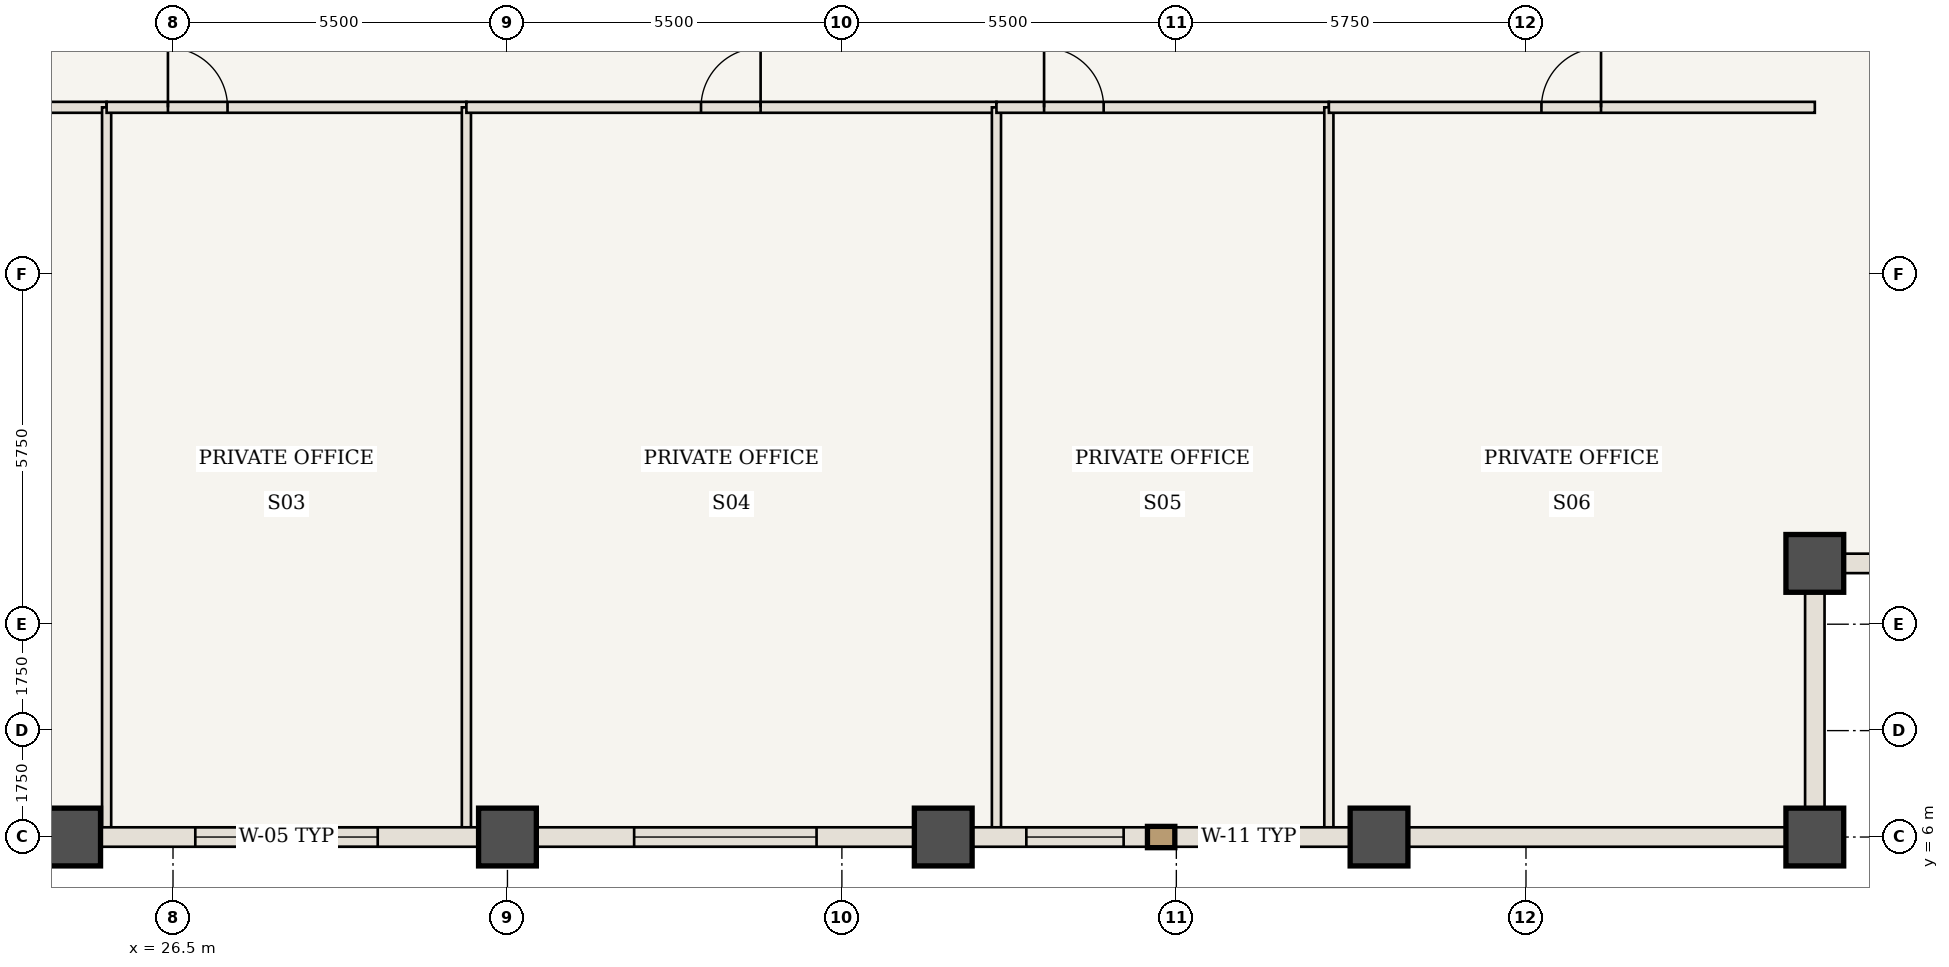
"""IFC4 building model, lengths in metres.
Left out: names, types, materials, properties, quantities, classifications, styles, units other than length and angle.
Written with IfcOpenShell. Run it as: python <this file> out.ifc"""

import sys

from ifc_helpers import new_model, si_unit, direction, frame, frame_2d, origin, origin_2d, place, context, subcontext, project, spatial, rectangle, extrude, element, fill, save


model = new_model("IFC4")
c1 = context("Model", 3, precision=1e-05, world=origin(), true_north=direction((0.0, 1.0)))
c2 = subcontext(c1, "Body", "Model", "MODEL_VIEW")
j1 = project(units=[si_unit("LENGTHUNIT", "METRE"), si_unit("PLANEANGLEUNIT", "RADIAN")], contexts=[c1])
p1 = place(None, origin())
s1 = spatial("IfcSite", under=j1, at=p1, CompositionType="ELEMENT")
p2 = place(p1, origin())
s2 = spatial("IfcBuilding", under=s1, at=p2, CompositionType="ELEMENT")
p3 = place(p2, frame((0.0, 0.0, 129.85)))
s3 = spatial("IfcBuildingStorey", under=s2, at=p3, CompositionType="ELEMENT", Elevation=129.85)
for number, where, z_axis, x_axis in (
    (1, (53.5, 6.0, 0.0), (0.0, 0.0, 1.0), (1.0, 0.0, 0.0)),
    (2, (53.5, 10.5, 0.0), (0.0, 0.0, 1.0), (1.0, 0.0, 0.0)),
    (3, (24.833, 6.0, 0.0), (0.0, 0.0, 1.0), (1.0, 0.0, 0.0)),
    (4, (32.0, 6.0, 0.0), (0.0, 0.0, 1.0), (1.0, 0.0, 0.0)),
    (5, (39.167, 6.0, 0.0), (0.0, 0.0, 1.0), (1.0, 0.0, 0.0)),
    (6, (46.333, 6.0, 0.0), (0.0, 0.0, 1.0), (1.0, 0.0, 0.0)),
):
    element("IfcColumn", number, at=place(p3, frame(where, z_axis=z_axis, x_axis=x_axis)), inside=s3, PredefinedType="COLUMN", context=c2, shape_type="SweptSolid", body=[
        extrude(rectangle(XDim=0.95, YDim=0.95, at=origin_2d()), origin(), (0.0, 0.0, 1.0), 3.85),
    ])
p4 = place(p3, frame((16.542, 18.0, 0.0), z_axis=(0.0, 0.0, 1.0), x_axis=(1.0, 0.0, 0.0)))
e7 = element("IfcWall", 7, at=p4, inside=s3, PredefinedType="STANDARD", context=c2, shape_type="SweptSolid", body=[
    extrude(rectangle(XDim=8.866, YDim=0.18, at=frame_2d((4.433, 0.0))), origin(), (0.0, 0.0, 1.0), 3.685),
])
p5 = place(p4, frame((5.383, 0.0, 0.0)))
e8 = element("IfcOpeningElement", 8, at=p5, cuts=e7, PredefinedType="OPENING", context=c2, shape_type="SweptSolid", body=[
    extrude(rectangle(XDim=0.98, YDim=2.2, at=frame_2d((0.49, 1.1))), frame((0.0, 0.1, 0.0), z_axis=(0.0, -1.0, 0.0), x_axis=(1.0, 0.0, 0.0)), (0.0, 0.0, 1.0), 0.2),
])
p6 = place(p3, frame((25.408, 6.06, 0.0), z_axis=(0.0, 0.0, 1.0), x_axis=(0.0, 1.0, 0.0)))
e9 = element("IfcWall", 9, at=p6, inside=s3, PredefinedType="STANDARD", context=c2, shape_type="SweptSolid", body=[
    extrude(rectangle(XDim=11.94, YDim=0.15, at=frame_2d((5.97, 0.0))), origin(), (0.0, 0.0, 1.0), 3.685),
])
p7 = place(p3, frame((25.408, 18.0, 0.0), z_axis=(0.0, 0.0, 1.0), x_axis=(1.0, 0.0, 0.0)))
e10 = element("IfcWall", 10, at=p7, inside=s3, PredefinedType="STANDARD", context=c2, shape_type="SweptSolid", body=[
    extrude(rectangle(XDim=5.917, YDim=0.18, at=frame_2d((2.958, 0.0))), origin(), (0.0, 0.0, 1.0), 3.685),
])
p8 = place(p7, frame((1.008, 0.0, 0.0)))
e11 = element("IfcOpeningElement", 11, at=p8, cuts=e10, PredefinedType="OPENING", context=c2, shape_type="SweptSolid", body=[
    extrude(rectangle(XDim=0.98, YDim=2.2, at=frame_2d((0.49, 1.1))), frame((0.0, 0.1, 0.0), z_axis=(0.0, -1.0, 0.0), x_axis=(1.0, 0.0, 0.0)), (0.0, 0.0, 1.0), 0.2),
])
p9 = place(p3, frame((31.325, 6.06, 0.0), z_axis=(0.0, 0.0, 1.0), x_axis=(0.0, 1.0, 0.0)))
e12 = element("IfcWall", 12, at=p9, inside=s3, PredefinedType="STANDARD", context=c2, shape_type="SweptSolid", body=[
    extrude(rectangle(XDim=11.94, YDim=0.15, at=frame_2d((5.97, 0.0))), origin(), (0.0, 0.0, 1.0), 3.685),
])
p10 = place(p3, frame((31.325, 18.0, 0.0), z_axis=(0.0, 0.0, 1.0), x_axis=(1.0, 0.0, 0.0)))
e13 = element("IfcWall", 13, at=p10, inside=s3, PredefinedType="STANDARD", context=c2, shape_type="SweptSolid", body=[
    extrude(rectangle(XDim=8.717, YDim=0.18, at=frame_2d((4.358, 0.0))), origin(), (0.0, 0.0, 1.0), 3.685),
])
p11 = place(p10, frame((3.858, 0.0, 0.0)))
e14 = element("IfcOpeningElement", 14, at=p11, cuts=e13, PredefinedType="OPENING", context=c2, shape_type="SweptSolid", body=[
    extrude(rectangle(XDim=0.98, YDim=2.2, at=frame_2d((0.49, 1.1))), frame((0.0, 0.1, 0.0), z_axis=(0.0, -1.0, 0.0), x_axis=(1.0, 0.0, 0.0)), (0.0, 0.0, 1.0), 0.2),
])
p12 = place(p3, frame((40.042, 6.06, 0.0), z_axis=(0.0, 0.0, 1.0), x_axis=(0.0, 1.0, 0.0)))
e15 = element("IfcWall", 15, at=p12, inside=s3, PredefinedType="STANDARD", context=c2, shape_type="SweptSolid", body=[
    extrude(rectangle(XDim=11.94, YDim=0.15, at=frame_2d((5.97, 0.0))), origin(), (0.0, 0.0, 1.0), 3.685),
])
p13 = place(p3, frame((40.042, 18.0, 0.0), z_axis=(0.0, 0.0, 1.0), x_axis=(1.0, 0.0, 0.0)))
e16 = element("IfcWall", 16, at=p13, inside=s3, PredefinedType="STANDARD", context=c2, shape_type="SweptSolid", body=[
    extrude(rectangle(XDim=5.467, YDim=0.18, at=frame_2d((2.733, 0.0))), origin(), (0.0, 0.0, 1.0), 3.685),
])
p14 = place(p13, frame((0.783, 0.0, 0.0)))
e17 = element("IfcOpeningElement", 17, at=p14, cuts=e16, PredefinedType="OPENING", context=c2, shape_type="SweptSolid", body=[
    extrude(rectangle(XDim=0.98, YDim=2.2, at=frame_2d((0.49, 1.1))), frame((0.0, 0.1, 0.0), z_axis=(0.0, -1.0, 0.0), x_axis=(1.0, 0.0, 0.0)), (0.0, 0.0, 1.0), 0.2),
])
p15 = place(p3, frame((45.508, 6.06, 0.0), z_axis=(0.0, 0.0, 1.0), x_axis=(0.0, 1.0, 0.0)))
e18 = element("IfcWall", 18, at=p15, inside=s3, PredefinedType="STANDARD", context=c2, shape_type="SweptSolid", body=[
    extrude(rectangle(XDim=11.94, YDim=0.15, at=frame_2d((5.97, 0.0))), origin(), (0.0, 0.0, 1.0), 3.685),
])
p16 = place(p3, frame((45.508, 18.0, 0.0), z_axis=(0.0, 0.0, 1.0), x_axis=(1.0, 0.0, 0.0)))
e19 = element("IfcWall", 19, at=p16, inside=s3, PredefinedType="STANDARD", context=c2, shape_type="SweptSolid", body=[
    extrude(rectangle(XDim=7.992, YDim=0.18, at=frame_2d((3.996, 0.0))), origin(), (0.0, 0.0, 1.0), 3.685),
])
p17 = place(p16, frame((3.496, 0.0, 0.0)))
e20 = element("IfcOpeningElement", 20, at=p17, cuts=e19, PredefinedType="OPENING", context=c2, shape_type="SweptSolid", body=[
    extrude(rectangle(XDim=0.98, YDim=2.2, at=frame_2d((0.49, 1.1))), frame((0.0, 0.1, 0.0), z_axis=(0.0, -1.0, 0.0), x_axis=(1.0, 0.0, 0.0)), (0.0, 0.0, 1.0), 0.2),
])
p18 = place(p3, frame((24.833, 6.0, 0.0), z_axis=(0.0, 0.0, 1.0), x_axis=(-1.0, 0.0, 0.0)))
e21 = element("IfcWall", 21, at=p18, inside=s3, PredefinedType="USERDEFINED", context=c2, shape_type="SweptSolid", body=[
    extrude(rectangle(XDim=7.167, YDim=0.32, at=frame_2d((3.583, 0.0))), origin(), (0.0, 0.0, 1.0), 2.885),
])
p19 = place(p18, frame((0.792, 0.0, 0.85)))
e22 = element("IfcOpeningElement", 22, at=p19, cuts=e21, PredefinedType="OPENING", context=c2, shape_type="SweptSolid", body=[
    extrude(rectangle(XDim=2.2, YDim=1.835, at=frame_2d((1.1, 0.917))), frame((0.0, 0.17, 0.0), z_axis=(0.0, -1.0, 0.0), x_axis=(1.0, 0.0, 0.0)), (0.0, 0.0, 1.0), 0.34),
])
p20 = place(p18, frame((4.175, 0.0, 0.85)))
e23 = element("IfcOpeningElement", 23, at=p20, cuts=e21, PredefinedType="OPENING", context=c2, shape_type="SweptSolid", body=[
    extrude(rectangle(XDim=2.2, YDim=1.835, at=frame_2d((1.1, 0.917))), frame((0.0, 0.17, 0.0), z_axis=(0.0, -1.0, 0.0), x_axis=(1.0, 0.0, 0.0)), (0.0, 0.0, 1.0), 0.34),
])
p21 = place(p3, frame((32.0, 6.0, 0.0), z_axis=(0.0, 0.0, 1.0), x_axis=(-1.0, 0.0, 0.0)))
e24 = element("IfcWall", 24, at=p21, inside=s3, PredefinedType="USERDEFINED", context=c2, shape_type="SweptSolid", body=[
    extrude(rectangle(XDim=7.167, YDim=0.32, at=frame_2d((3.583, 0.0))), origin(), (0.0, 0.0, 1.0), 2.885),
])
p22 = place(p21, frame((2.133, 0.0, 0.85)))
e25 = element("IfcOpeningElement", 25, at=p22, cuts=e24, PredefinedType="OPENING", context=c2, shape_type="SweptSolid", body=[
    extrude(rectangle(XDim=3.0, YDim=1.835, at=frame_2d((1.5, 0.917))), frame((0.0, 0.17, 0.0), z_axis=(0.0, -1.0, 0.0), x_axis=(1.0, 0.0, 0.0)), (0.0, 0.0, 1.0), 0.34),
])
p23 = place(p3, frame((39.167, 6.0, 0.0), z_axis=(0.0, 0.0, 1.0), x_axis=(-1.0, 0.0, 0.0)))
e26 = element("IfcWall", 26, at=p23, inside=s3, PredefinedType="USERDEFINED", context=c2, shape_type="SweptSolid", body=[
    extrude(rectangle(XDim=7.167, YDim=0.32, at=frame_2d((3.583, 0.0))), origin(), (0.0, 0.0, 1.0), 2.885),
])
p24 = place(p23, frame((2.083, 0.0, 0.85)))
e27 = element("IfcOpeningElement", 27, at=p24, cuts=e26, PredefinedType="OPENING", context=c2, shape_type="SweptSolid", body=[
    extrude(rectangle(XDim=3.0, YDim=1.835, at=frame_2d((1.5, 0.917))), frame((0.0, 0.17, 0.0), z_axis=(0.0, -1.0, 0.0), x_axis=(1.0, 0.0, 0.0)), (0.0, 0.0, 1.0), 0.34),
])
p25 = place(p3, frame((46.333, 6.0, 0.0), z_axis=(0.0, 0.0, 1.0), x_axis=(-1.0, 0.0, 0.0)))
e28 = element("IfcWall", 28, at=p25, inside=s3, PredefinedType="USERDEFINED", context=c2, shape_type="SweptSolid", body=[
    extrude(rectangle(XDim=7.167, YDim=0.32, at=frame_2d((3.583, 0.0))), origin(), (0.0, 0.0, 1.0), 2.885),
])
p26 = place(p25, frame((1.342, 0.0, 0.85)))
e29 = element("IfcOpeningElement", 29, at=p26, cuts=e28, PredefinedType="OPENING", context=c2, shape_type="SweptSolid", body=[
    extrude(rectangle(XDim=1.6, YDim=1.835, at=frame_2d((0.8, 0.917))), frame((0.0, 0.17, 0.0), z_axis=(0.0, -1.0, 0.0), x_axis=(1.0, 0.0, 0.0)), (0.0, 0.0, 1.0), 0.34),
])
p27 = place(p25, frame((4.2, 0.0, 0.85)))
e30 = element("IfcOpeningElement", 30, at=p27, cuts=e28, PredefinedType="OPENING", context=c2, shape_type="SweptSolid", body=[
    extrude(rectangle(XDim=1.6, YDim=1.835, at=frame_2d((0.8, 0.917))), frame((0.0, 0.17, 0.0), z_axis=(0.0, -1.0, 0.0), x_axis=(1.0, 0.0, 0.0)), (0.0, 0.0, 1.0), 0.34),
])
p28 = place(p3, frame((53.5, 6.0, 0.0), z_axis=(0.0, 0.0, 1.0), x_axis=(-1.0, 0.0, 0.0)))
e31 = element("IfcWall", 31, at=p28, inside=s3, PredefinedType="USERDEFINED", context=c2, shape_type="SweptSolid", body=[
    extrude(rectangle(XDim=7.167, YDim=0.32, at=frame_2d((3.583, 0.0))), origin(), (0.0, 0.0, 1.0), 2.885),
])
for number, where, z_axis, x_axis in (
    (32, (53.5, 10.5, 0.0), (0.0, 0.0, 1.0), (0.0, -1.0, 0.0)),
    (33, (58.0, 10.5, 0.0), (0.0, 0.0, 1.0), (-1.0, 0.0, 0.0)),
):
    element("IfcWall", number, at=place(p3, frame(where, z_axis=z_axis, x_axis=x_axis)), inside=s3, PredefinedType="USERDEFINED", context=c2, shape_type="SweptSolid", body=[
        extrude(rectangle(XDim=4.5, YDim=0.32, at=frame_2d((2.25, 0.0))), origin(), (0.0, 0.0, 1.0), 2.885),
    ])
p29 = place(p8, origin())
e34 = element("IfcDoor", 34, at=p29, inside=s3, OperationType="SINGLE_SWING_LEFT", PredefinedType="DOOR", context=c2, shape_type="SweptSolid", body=[
    extrude(rectangle(XDim=0.98, YDim=2.2, at=frame_2d((0.49, 1.1))), frame((0.0, 0.025, 0.0), z_axis=(0.0, -1.0, 0.0), x_axis=(1.0, 0.0, 0.0)), (0.0, 0.0, 1.0), 0.05),
])
fill(e11, e34)
p30 = place(p11, origin())
e35 = element("IfcDoor", 35, at=p30, inside=s3, OperationType="SINGLE_SWING_RIGHT", PredefinedType="DOOR", context=c2, shape_type="SweptSolid", body=[
    extrude(rectangle(XDim=0.98, YDim=2.2, at=frame_2d((0.49, 1.1))), frame((0.0, 0.025, 0.0), z_axis=(0.0, -1.0, 0.0), x_axis=(1.0, 0.0, 0.0)), (0.0, 0.0, 1.0), 0.05),
])
fill(e14, e35)
p31 = place(p14, origin())
e36 = element("IfcDoor", 36, at=p31, inside=s3, OperationType="SINGLE_SWING_LEFT", PredefinedType="DOOR", context=c2, shape_type="SweptSolid", body=[
    extrude(rectangle(XDim=0.98, YDim=2.2, at=frame_2d((0.49, 1.1))), frame((0.0, 0.025, 0.0), z_axis=(0.0, -1.0, 0.0), x_axis=(1.0, 0.0, 0.0)), (0.0, 0.0, 1.0), 0.05),
])
fill(e17, e36)
p32 = place(p17, origin())
e37 = element("IfcDoor", 37, at=p32, inside=s3, OperationType="SINGLE_SWING_RIGHT", PredefinedType="DOOR", context=c2, shape_type="SweptSolid", body=[
    extrude(rectangle(XDim=0.98, YDim=2.2, at=frame_2d((0.49, 1.1))), frame((0.0, 0.025, 0.0), z_axis=(0.0, -1.0, 0.0), x_axis=(1.0, 0.0, 0.0)), (0.0, 0.0, 1.0), 0.05),
])
fill(e20, e37)
p33 = place(p22, origin())
e38 = element("IfcWindow", 38, at=p33, inside=s3, PartitioningType="SINGLE_PANEL", PredefinedType="WINDOW", context=c2, shape_type="SweptSolid", body=[
    extrude(rectangle(XDim=3.0, YDim=1.835, at=frame_2d((1.5, 0.917))), frame((0.0, 0.03, 0.0), z_axis=(0.0, -1.0, 0.0), x_axis=(1.0, 0.0, 0.0)), (0.0, 0.0, 1.0), 0.06),
])
fill(e25, e38)
p34 = place(p24, origin())
e39 = element("IfcWindow", 39, at=p34, inside=s3, PartitioningType="SINGLE_PANEL", PredefinedType="WINDOW", context=c2, shape_type="SweptSolid", body=[
    extrude(rectangle(XDim=3.0, YDim=1.835, at=frame_2d((1.5, 0.917))), frame((0.0, 0.03, 0.0), z_axis=(0.0, -1.0, 0.0), x_axis=(1.0, 0.0, 0.0)), (0.0, 0.0, 1.0), 0.06),
])
fill(e27, e39)
p35 = place(p26, origin())
e40 = element("IfcWindow", 40, at=p35, inside=s3, PartitioningType="SINGLE_PANEL", PredefinedType="WINDOW", context=c2, shape_type="SweptSolid", body=[
    extrude(rectangle(XDim=1.6, YDim=1.835, at=frame_2d((0.8, 0.917))), frame((0.0, 0.03, 0.0), z_axis=(0.0, -1.0, 0.0), x_axis=(1.0, 0.0, 0.0)), (0.0, 0.0, 1.0), 0.06),
])
fill(e29, e40)
p36 = place(p27, origin())
e41 = element("IfcWindow", 41, at=p36, inside=s3, PartitioningType="SINGLE_PANEL", PredefinedType="WINDOW", context=c2, shape_type="SweptSolid", body=[
    extrude(rectangle(XDim=1.6, YDim=1.835, at=frame_2d((0.8, 0.917))), frame((0.0, 0.03, 0.0), z_axis=(0.0, -1.0, 0.0), x_axis=(1.0, 0.0, 0.0)), (0.0, 0.0, 1.0), 0.06),
])
fill(e30, e41)
save(model, sys.argv[1])
